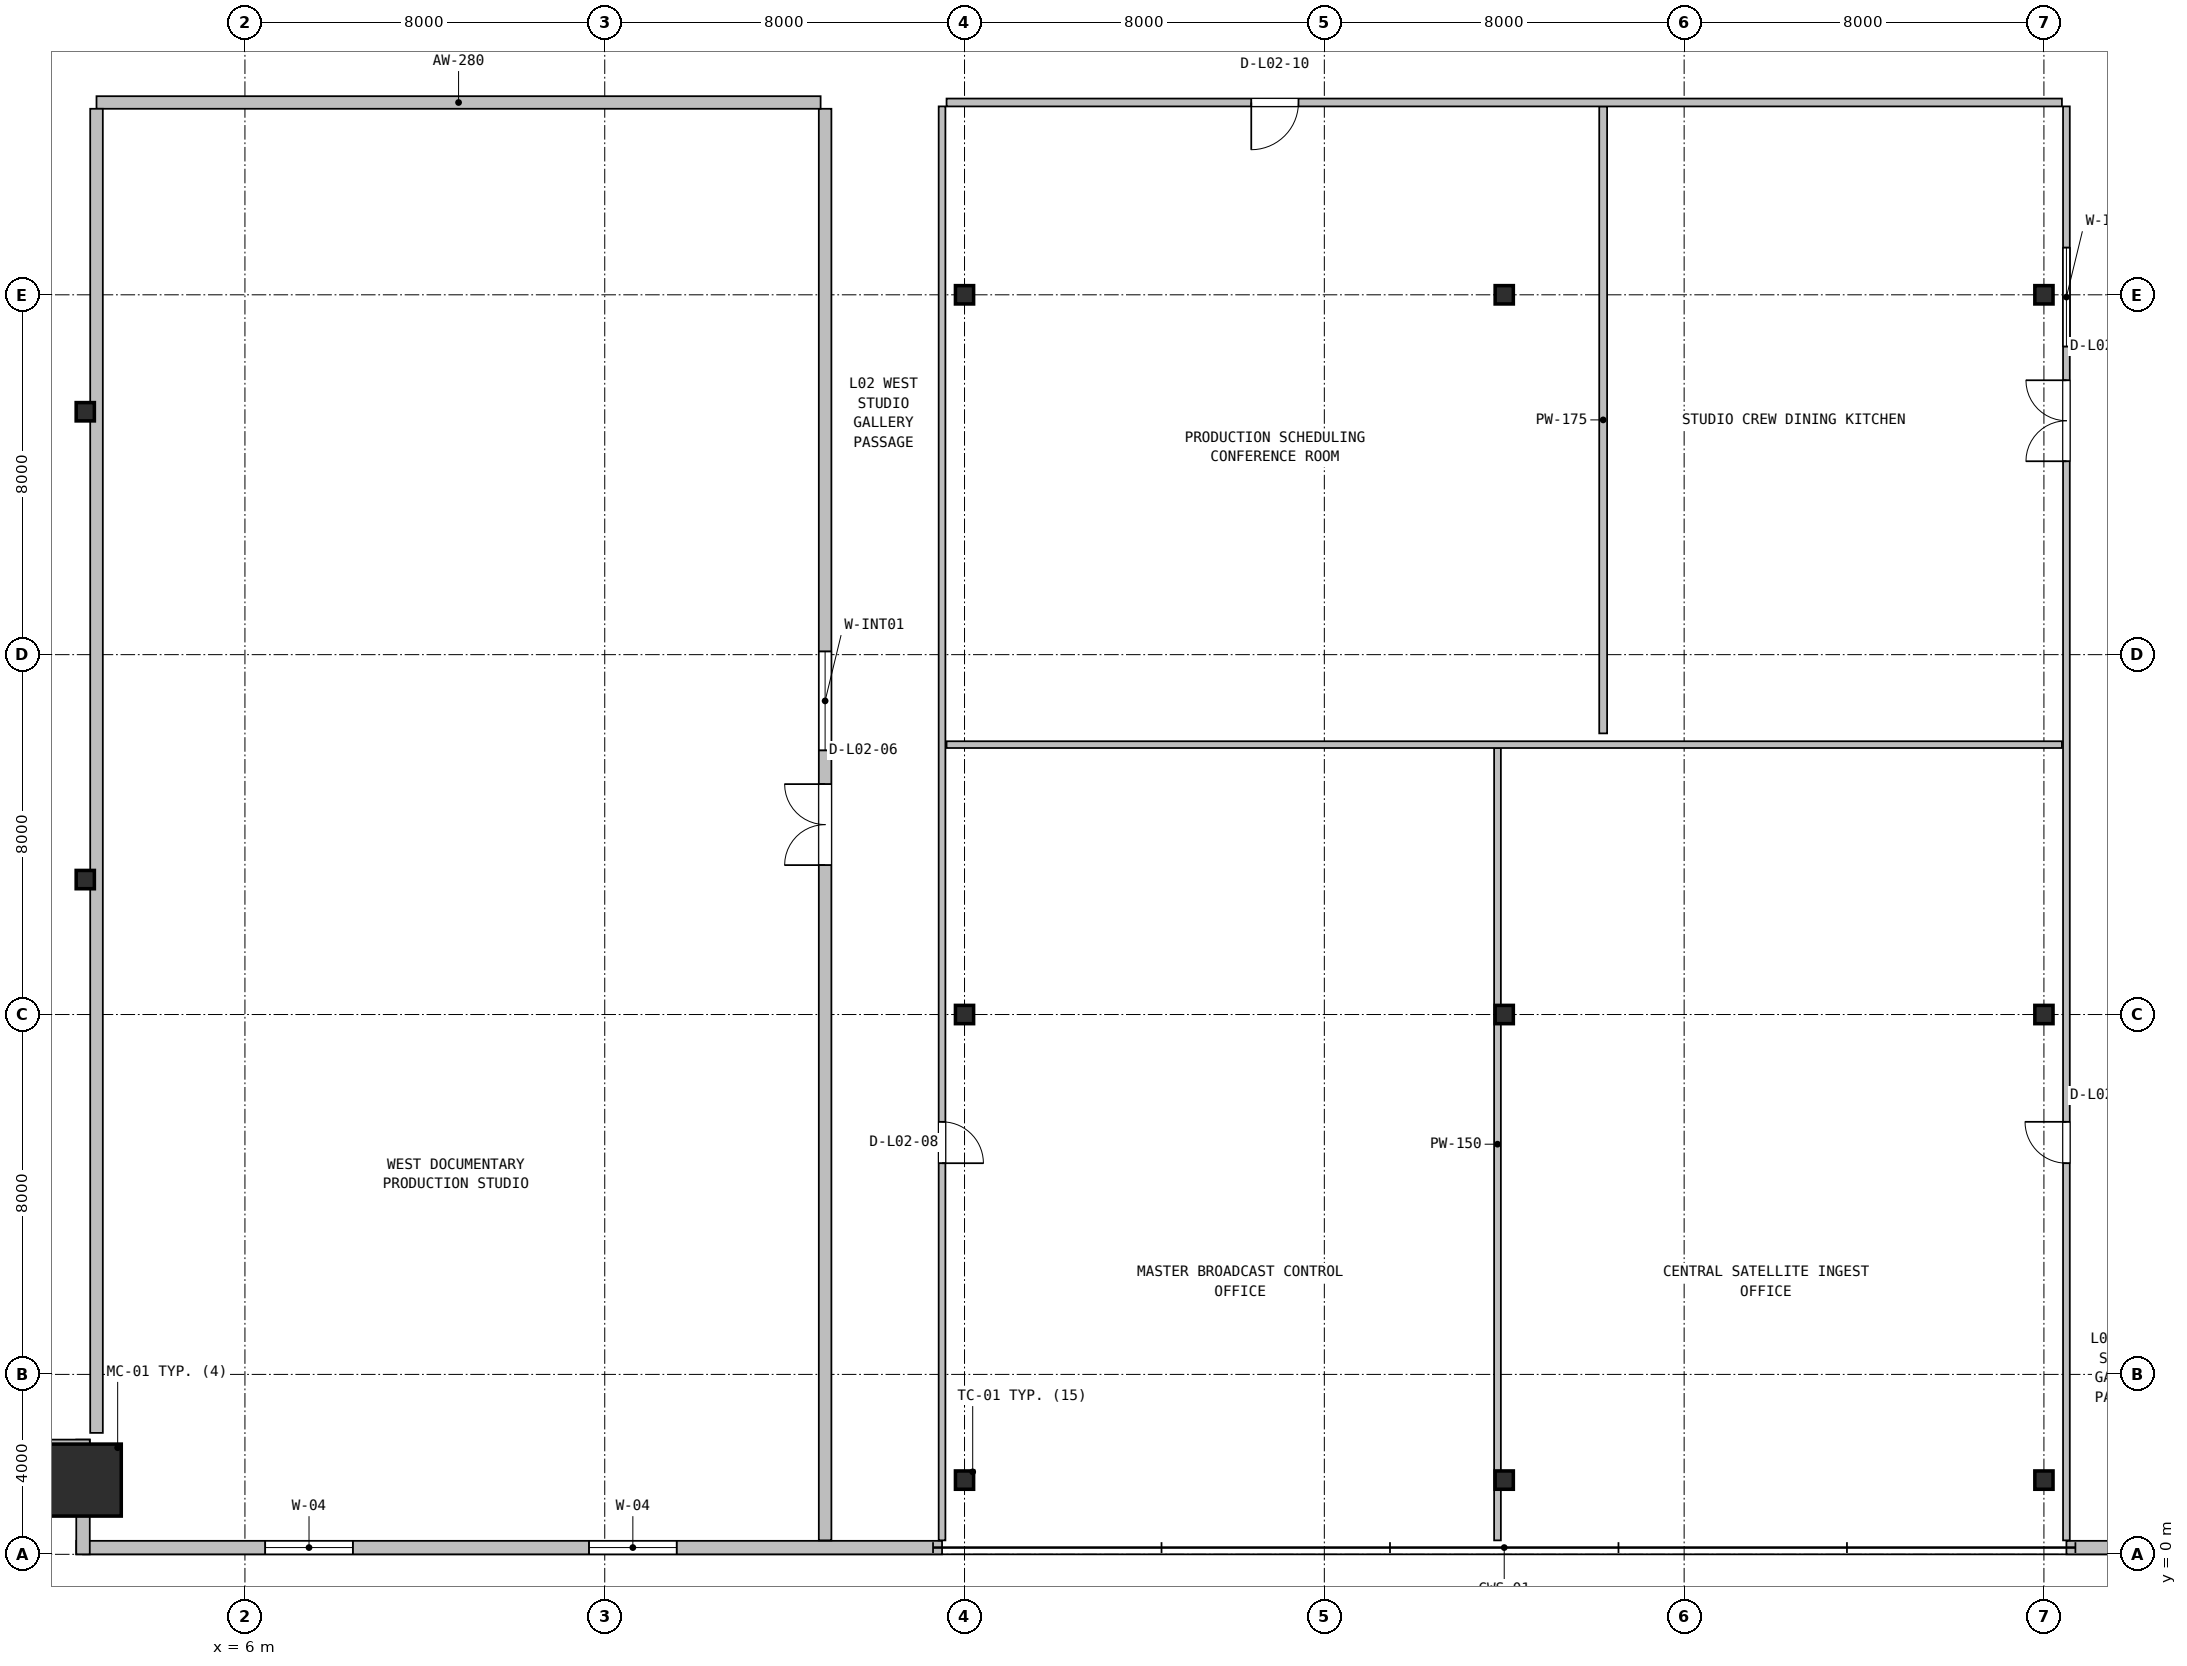
"""IFC4 building model, lengths in metres.
Left out: names, types, materials, properties, quantities, classifications, styles, units other than length and angle.
Written with IfcOpenShell. Run it as: python <this file> out.ifc"""

import sys

from ifc_helpers import new_model, si_unit, direction, frame, frame_2d, origin, origin_2d, place, context, subcontext, project, spatial, rectangle, hollow_rectangle, i_section, extrude, source, transform, mapped, element, fill, save


model = new_model("IFC4")
c1 = context("Model", 3, precision=1e-05, world=origin(), true_north=direction((0.0, 1.0)))
c2 = subcontext(c1, "Body", "Model", "MODEL_VIEW")
j1 = project(units=[si_unit("LENGTHUNIT", "METRE"), si_unit("PLANEANGLEUNIT", "RADIAN")], contexts=[c1])
p1 = place(None, origin())
s1 = spatial("IfcSite", under=j1, at=p1, CompositionType="ELEMENT")
p2 = place(p1, origin())
s2 = spatial("IfcBuilding", under=s1, at=p2, CompositionType="ELEMENT")
p3 = place(p2, frame((0.0, 0.0, 11.4)))
s3 = spatial("IfcBuildingStorey", under=s2, at=p3, CompositionType="ELEMENT", Elevation=11.4)
m1 = source(origin(), c2, "Body", "SweptSolid", [
    extrude(hollow_rectangle(XDim=1.6, YDim=1.6, WallThickness=0.06, at=origin_2d()), origin(), (0.0, 0.0, 1.0), 5.4),
])
p4 = place(p3, frame((2.45, 1.65, 0.0), z_axis=(0.0, 0.0, 1.0), x_axis=(1.0, 0.0, 0.0)))
e1 = element("IfcColumn", 1, at=p4, inside=s3, PredefinedType="COLUMN", context=c2, shape_type="MappedRepresentation", body=[
    mapped(m1, transform((0.0, 0.0, 0.0), x_axis=(1.0, 0.0, 0.0), y_axis=(0.0, 1.0, 0.0), z_axis=(0.0, 0.0, 1.0), scale=1.0)),
])
m2 = source(origin(), c2, "Body", "SweptSolid", [
    extrude(i_section(OverallWidth=0.404, OverallDepth=0.407, WebThickness=0.027, FlangeThickness=0.044, FilletRadius=0.018, at=origin_2d()), origin(), (0.0, 0.0, 1.0), 5.4),
])
for number, where, z_axis, x_axis in (
    (2, (22.0, 1.65, 0.0), (0.0, 0.0, 1.0), (1.0, 0.0, 0.0)),
    (3, (34.0, 1.65, 0.0), (0.0, 0.0, 1.0), (1.0, 0.0, 0.0)),
    (4, (46.0, 1.65, 0.0), (0.0, 0.0, 1.0), (1.0, 0.0, 0.0)),
    (5, (22.0, 12.0, 0.0), (0.0, 0.0, 1.0), (1.0, 0.0, 0.0)),
    (6, (34.0, 12.0, 0.0), (0.0, 0.0, 1.0), (1.0, 0.0, 0.0)),
    (7, (46.0, 12.0, 0.0), (0.0, 0.0, 1.0), (1.0, 0.0, 0.0)),
    (8, (22.0, 28.0, 0.0), (0.0, 0.0, 1.0), (1.0, 0.0, 0.0)),
    (9, (34.0, 28.0, 0.0), (0.0, 0.0, 1.0), (1.0, 0.0, 0.0)),
    (10, (46.0, 28.0, 0.0), (0.0, 0.0, 1.0), (1.0, 0.0, 0.0)),
    (11, (2.45, 15.0, 0.0), (0.0, 0.0, 1.0), (1.0, 0.0, 0.0)),
    (12, (2.45, 25.4, 0.0), (0.0, 0.0, 1.0), (1.0, 0.0, 0.0)),
):
    element("IfcColumn", number, at=place(p3, frame(where, z_axis=z_axis, x_axis=x_axis)), inside=s3, PredefinedType="COLUMN", context=c2, shape_type="MappedRepresentation", body=[
        mapped(m2, transform((0.0, 0.0, 0.0), x_axis=(1.0, 0.0, 0.0), y_axis=(0.0, 1.0, 0.0), z_axis=(0.0, 0.0, 1.0), scale=1.0)),
    ])
p5 = place(p3, frame((2.25, 0.15, 0.0), z_axis=(0.0, 0.0, 1.0), x_axis=(1.0, 0.0, 0.0)))
e13 = element("IfcWall", 13, at=p5, inside=s3, PredefinedType="SOLIDWALL", context=c2, shape_type="SweptSolid", body=[
    extrude(rectangle(XDim=19.25, YDim=0.3, at=frame_2d((9.625, 0.0))), origin(), (0.0, 0.0, 1.0), 5.1),
])
p6 = place(p5, frame((4.2, 0.0, 0.9)))
e14 = element("IfcOpeningElement", 14, at=p6, cuts=e13, PredefinedType="OPENING", context=c2, shape_type="SweptSolid", body=[
    extrude(rectangle(XDim=1.95, YDim=1.95, at=frame_2d((0.975, 0.975))), frame((0.0, 0.16, 0.0), z_axis=(0.0, -1.0, 0.0), x_axis=(1.0, 0.0, 0.0)), (0.0, 0.0, 1.0), 0.32),
])
p7 = place(p5, frame((11.4, 0.0, 0.9)))
e15 = element("IfcOpeningElement", 15, at=p7, cuts=e13, PredefinedType="OPENING", context=c2, shape_type="SweptSolid", body=[
    extrude(rectangle(XDim=1.95, YDim=1.95, at=frame_2d((0.975, 0.975))), frame((0.0, 0.16, 0.0), z_axis=(0.0, -1.0, 0.0), x_axis=(1.0, 0.0, 0.0)), (0.0, 0.0, 1.0), 0.32),
])
p8 = place(p3, frame((46.5, 0.15, 0.0), z_axis=(0.0, 0.0, 1.0), x_axis=(1.0, 0.0, 0.0)))
e16 = element("IfcWall", 16, at=p8, inside=s3, PredefinedType="SOLIDWALL", context=c2, shape_type="SweptSolid", body=[
    extrude(rectangle(XDim=19.25, YDim=0.3, at=frame_2d((9.625, 0.0))), origin(), (0.0, 0.0, 1.0), 5.1),
])
p9 = place(p8, frame((4.2, 0.0, 0.9)))
e17 = element("IfcOpeningElement", 17, at=p9, cuts=e16, PredefinedType="OPENING", context=c2, shape_type="SweptSolid", body=[
    extrude(rectangle(XDim=1.95, YDim=1.95, at=frame_2d((0.975, 0.975))), frame((0.0, 0.16, 0.0), z_axis=(0.0, -1.0, 0.0), x_axis=(1.0, 0.0, 0.0)), (0.0, 0.0, 1.0), 0.32),
])
p10 = place(p8, frame((11.4, 0.0, 0.9)))
e18 = element("IfcOpeningElement", 18, at=p10, cuts=e16, PredefinedType="OPENING", context=c2, shape_type="SweptSolid", body=[
    extrude(rectangle(XDim=1.95, YDim=1.95, at=frame_2d((0.975, 0.975))), frame((0.0, 0.16, 0.0), z_axis=(0.0, -1.0, 0.0), x_axis=(1.0, 0.0, 0.0)), (0.0, 0.0, 1.0), 0.32),
])
for number, where, z_axis, x_axis in (
    (19, (2.4, 0.0, 0.0), (0.0, 0.0, 1.0), (0.0, 1.0, 0.0)),
    (20, (0.0, 2.4, 0.0), (0.0, 0.0, 1.0), (1.0, 0.0, 0.0)),
):
    element("IfcWall", number, at=place(p3, frame(where, z_axis=z_axis, x_axis=x_axis)), inside=s3, PredefinedType="SOLIDWALL", context=c2, shape_type="SweptSolid", body=[
        extrude(rectangle(XDim=2.55, YDim=0.3, at=frame_2d((1.275, 0.0))), origin(), (0.0, 0.0, 1.0), 4.183),
    ])
p11 = place(p3, frame((18.9, 0.31, 0.0), z_axis=(0.0, 0.0, 1.0), x_axis=(0.0, 1.0, 0.0)))
e21 = element("IfcWall", 21, at=p11, inside=s3, PredefinedType="SOLIDWALL", context=c2, shape_type="SweptSolid", body=[
    extrude(rectangle(XDim=31.825, YDim=0.28, at=frame_2d((15.913, 0.0))), origin(), (0.0, 0.0, 1.0), 4.183),
])
p12 = place(p11, frame((15.012, 0.0, 0.0)))
e22 = element("IfcOpeningElement", 22, at=p12, cuts=e21, PredefinedType="OPENING", context=c2, shape_type="SweptSolid", body=[
    extrude(rectangle(XDim=1.8, YDim=2.25, at=frame_2d((0.9, 1.125))), frame((0.0, 0.15, 0.0), z_axis=(0.0, -1.0, 0.0), x_axis=(1.0, 0.0, 0.0)), (0.0, 0.0, 1.0), 0.3),
])
p13 = place(p11, frame((17.562, 0.0, 0.95)))
e23 = element("IfcOpeningElement", 23, at=p13, cuts=e21, PredefinedType="OPENING", context=c2, shape_type="SweptSolid", body=[
    extrude(rectangle(XDim=2.2, YDim=1.3, at=frame_2d((1.1, 0.65))), frame((0.0, 0.15, 0.0), z_axis=(0.0, -1.0, 0.0), x_axis=(1.0, 0.0, 0.0)), (0.0, 0.0, 1.0), 0.3),
])
p14 = place(p3, frame((2.7, 32.275, 0.0), z_axis=(0.0, 0.0, 1.0), x_axis=(1.0, 0.0, 0.0)))
e24 = element("IfcWall", 24, at=p14, inside=s3, PredefinedType="SOLIDWALL", context=c2, shape_type="SweptSolid", body=[
    extrude(rectangle(XDim=16.1, YDim=0.28, at=frame_2d((8.05, 0.0))), origin(), (0.0, 0.0, 1.0), 5.1),
])
p15 = place(p3, frame((2.7, 2.7, 0.0), z_axis=(0.0, 0.0, 1.0), x_axis=(0.0, 1.0, 0.0)))
e25 = element("IfcWall", 25, at=p15, inside=s3, PredefinedType="SOLIDWALL", context=c2, shape_type="SweptSolid", body=[
    extrude(rectangle(XDim=29.435, YDim=0.28, at=frame_2d((14.718, 0.0))), origin(), (0.0, 0.0, 1.0), 4.183),
])
p16 = place(p3, frame((33.85, 0.31, 0.0), z_axis=(0.0, 0.0, 1.0), x_axis=(0.0, 1.0, 0.0)))
e26 = element("IfcWall", 26, at=p16, inside=s3, PredefinedType="PARTITIONING", context=c2, shape_type="SweptSolid", body=[
    extrude(rectangle(XDim=17.615, YDim=0.15, at=frame_2d((8.808, 0.0))), origin(), (0.0, 0.0, 1.0), 4.183),
])
p17 = place(p3, frame((21.6, 18.0, 0.0), z_axis=(0.0, 0.0, 1.0), x_axis=(1.0, 0.0, 0.0)))
e27 = element("IfcWall", 27, at=p17, inside=s3, PredefinedType="PARTITIONING", context=c2, shape_type="SweptSolid", body=[
    extrude(rectangle(XDim=24.8, YDim=0.15, at=frame_2d((12.4, 0.0))), origin(), (0.0, 0.0, 1.0), 4.183),
])
p18 = place(p3, frame((21.5, 0.31, 0.0), z_axis=(0.0, 0.0, 1.0), x_axis=(0.0, 1.0, 0.0)))
e28 = element("IfcWall", 28, at=p18, inside=s3, PredefinedType="PARTITIONING", context=c2, shape_type="SweptSolid", body=[
    extrude(rectangle(XDim=31.878, YDim=0.15, at=frame_2d((15.939, 0.0))), origin(), (0.0, 0.0, 1.0), 4.183),
])
p19 = place(p18, frame((8.385, 0.0, 0.0)))
e29 = element("IfcOpeningElement", 29, at=p19, cuts=e28, PredefinedType="OPENING", context=c2, shape_type="SweptSolid", body=[
    extrude(rectangle(XDim=0.92, YDim=2.08, at=frame_2d((0.46, 1.04))), frame((0.0, 0.085, 0.0), z_axis=(0.0, -1.0, 0.0), x_axis=(1.0, 0.0, 0.0)), (0.0, 0.0, 1.0), 0.17),
])
p20 = place(p3, frame((46.5, 0.31, 0.0), z_axis=(0.0, 0.0, 1.0), x_axis=(0.0, 1.0, 0.0)))
e30 = element("IfcWall", 30, at=p20, inside=s3, PredefinedType="PARTITIONING", context=c2, shape_type="SweptSolid", body=[
    extrude(rectangle(XDim=31.878, YDim=0.15, at=frame_2d((15.939, 0.0))), origin(), (0.0, 0.0, 1.0), 4.183),
])
p21 = place(p20, frame((8.385, 0.0, 0.0)))
e31 = element("IfcOpeningElement", 31, at=p21, cuts=e30, PredefinedType="OPENING", context=c2, shape_type="SweptSolid", body=[
    extrude(rectangle(XDim=0.92, YDim=2.08, at=frame_2d((0.46, 1.04))), frame((0.0, 0.085, 0.0), z_axis=(0.0, -1.0, 0.0), x_axis=(1.0, 0.0, 0.0)), (0.0, 0.0, 1.0), 0.17),
])
p22 = place(p20, frame((23.99, 0.0, 0.0)))
e32 = element("IfcOpeningElement", 32, at=p22, cuts=e30, PredefinedType="OPENING", context=c2, shape_type="SweptSolid", body=[
    extrude(rectangle(XDim=1.8, YDim=2.25, at=frame_2d((0.9, 1.125))), frame((0.0, 0.085, 0.0), z_axis=(0.0, -1.0, 0.0), x_axis=(1.0, 0.0, 0.0)), (0.0, 0.0, 1.0), 0.17),
])
p23 = place(p20, frame((26.54, 0.0, 0.95)))
e33 = element("IfcOpeningElement", 33, at=p23, cuts=e30, PredefinedType="OPENING", context=c2, shape_type="SweptSolid", body=[
    extrude(rectangle(XDim=2.2, YDim=1.3, at=frame_2d((1.1, 0.65))), frame((0.0, 0.085, 0.0), z_axis=(0.0, -1.0, 0.0), x_axis=(1.0, 0.0, 0.0)), (0.0, 0.0, 1.0), 0.17),
])
p24 = place(p3, frame((36.2, 18.25, 0.0), z_axis=(0.0, 0.0, 1.0), x_axis=(0.0, 1.0, 0.0)))
e34 = element("IfcWall", 34, at=p24, inside=s3, PredefinedType="PARTITIONING", context=c2, shape_type="SweptSolid", body=[
    extrude(rectangle(XDim=13.938, YDim=0.175, at=frame_2d((6.969, 0.0))), origin(), (0.0, 0.0, 1.0), 4.183),
])
p25 = place(p3, frame((21.6, 32.275, 0.0), z_axis=(0.0, 0.0, 1.0), x_axis=(1.0, 0.0, 0.0)))
e35 = element("IfcWall", 35, at=p25, inside=s3, PredefinedType="PARTITIONING", context=c2, shape_type="SweptSolid", body=[
    extrude(rectangle(XDim=24.8, YDim=0.175, at=frame_2d((12.4, 0.0))), origin(), (0.0, 0.0, 1.0), 4.183),
])
p26 = place(p25, frame((6.775, 0.0, 0.0)))
e36 = element("IfcOpeningElement", 36, at=p26, cuts=e35, PredefinedType="OPENING", context=c2, shape_type="SweptSolid", body=[
    extrude(rectangle(XDim=1.05, YDim=2.1, at=frame_2d((0.525, 1.05))), frame((0.0, 0.098, 0.0), z_axis=(0.0, -1.0, 0.0), x_axis=(1.0, 0.0, 0.0)), (0.0, 0.0, 1.0), 0.195),
])
m3 = source(origin(), c2, "Body", "SweptSolid", [
    extrude(rectangle(XDim=1.95, YDim=1.95, at=frame_2d((0.975, 0.975))), frame((0.0, 0.03, 0.0), z_axis=(0.0, -1.0, 0.0), x_axis=(1.0, 0.0, 0.0)), (0.0, 0.0, 1.0), 0.06),
])
p27 = place(p6, origin())
e37 = element("IfcWindow", 37, at=p27, inside=s3, PartitioningType="SINGLE_PANEL", PredefinedType="WINDOW", context=c2, shape_type="MappedRepresentation", body=[
    mapped(m3, transform((0.0, 0.0, 0.0), x_axis=(1.0, 0.0, 0.0), y_axis=(0.0, 1.0, 0.0), z_axis=(0.0, 0.0, 1.0), scale=1.0)),
])
fill(e14, e37)
p28 = place(p7, origin())
e38 = element("IfcWindow", 38, at=p28, inside=s3, PartitioningType="SINGLE_PANEL", PredefinedType="WINDOW", context=c2, shape_type="MappedRepresentation", body=[
    mapped(m3, transform((0.0, 0.0, 0.0), x_axis=(1.0, 0.0, 0.0), y_axis=(0.0, 1.0, 0.0), z_axis=(0.0, 0.0, 1.0), scale=1.0)),
])
fill(e15, e38)
m4 = source(origin(), c2, "Body", "SweptSolid", [
    extrude(rectangle(XDim=1.8, YDim=2.25, at=frame_2d((0.9, 1.125))), frame((0.0, 0.025, 0.0), z_axis=(0.0, -1.0, 0.0), x_axis=(1.0, 0.0, 0.0)), (0.0, 0.0, 1.0), 0.05),
])
p29 = place(p12, origin())
e39 = element("IfcDoor", 39, at=p29, inside=s3, OperationType="DOUBLE_DOOR_SINGLE_SWING", PredefinedType="DOOR", context=c2, shape_type="MappedRepresentation", body=[
    mapped(m4, transform((0.0, 0.0, 0.0), x_axis=(1.0, 0.0, 0.0), y_axis=(0.0, 1.0, 0.0), z_axis=(0.0, 0.0, 1.0), scale=1.0)),
])
fill(e22, e39)
m5 = source(origin(), c2, "Body", "SweptSolid", [
    extrude(rectangle(XDim=2.2, YDim=1.3, at=frame_2d((1.1, 0.65))), frame((0.0, 0.03, 0.0), z_axis=(0.0, -1.0, 0.0), x_axis=(1.0, 0.0, 0.0)), (0.0, 0.0, 1.0), 0.06),
])
p30 = place(p13, origin())
e40 = element("IfcWindow", 40, at=p30, inside=s3, PartitioningType="SINGLE_PANEL", PredefinedType="WINDOW", context=c2, shape_type="MappedRepresentation", body=[
    mapped(m5, transform((0.0, 0.0, 0.0), x_axis=(1.0, 0.0, 0.0), y_axis=(0.0, 1.0, 0.0), z_axis=(0.0, 0.0, 1.0), scale=1.0)),
])
fill(e23, e40)
m6 = source(origin(), c2, "Body", "SweptSolid", [
    extrude(rectangle(XDim=0.92, YDim=2.08, at=frame_2d((0.46, 1.04))), frame((0.0, 0.025, 0.0), z_axis=(0.0, -1.0, 0.0), x_axis=(1.0, 0.0, 0.0)), (0.0, 0.0, 1.0), 0.05),
])
p31 = place(p19, frame((0.92, 0.0, 0.0), z_axis=(0.0, 0.0, 1.0), x_axis=(-1.0, 0.0, 0.0)))
e41 = element("IfcDoor", 41, at=p31, inside=s3, OperationType="SINGLE_SWING_LEFT", PredefinedType="DOOR", context=c2, shape_type="MappedRepresentation", body=[
    mapped(m6, transform((0.0, 0.0, 0.0), x_axis=(1.0, 0.0, 0.0), y_axis=(0.0, 1.0, 0.0), z_axis=(0.0, 0.0, 1.0), scale=1.0)),
])
fill(e29, e41)
p32 = place(p21, origin())
e42 = element("IfcDoor", 42, at=p32, inside=s3, OperationType="SINGLE_SWING_RIGHT", PredefinedType="DOOR", context=c2, shape_type="MappedRepresentation", body=[
    mapped(m6, transform((0.0, 0.0, 0.0), x_axis=(1.0, 0.0, 0.0), y_axis=(0.0, 1.0, 0.0), z_axis=(0.0, 0.0, 1.0), scale=1.0)),
])
fill(e31, e42)
p33 = place(p22, origin())
e43 = element("IfcDoor", 43, at=p33, inside=s3, OperationType="DOUBLE_DOOR_SINGLE_SWING", PredefinedType="DOOR", context=c2, shape_type="MappedRepresentation", body=[
    mapped(m4, transform((0.0, 0.0, 0.0), x_axis=(1.0, 0.0, 0.0), y_axis=(0.0, 1.0, 0.0), z_axis=(0.0, 0.0, 1.0), scale=1.0)),
])
fill(e32, e43)
p34 = place(p23, origin())
e44 = element("IfcWindow", 44, at=p34, inside=s3, PartitioningType="SINGLE_PANEL", PredefinedType="WINDOW", context=c2, shape_type="MappedRepresentation", body=[
    mapped(m5, transform((0.0, 0.0, 0.0), x_axis=(1.0, 0.0, 0.0), y_axis=(0.0, 1.0, 0.0), z_axis=(0.0, 0.0, 1.0), scale=1.0)),
])
fill(e33, e44)
m7 = source(origin(), c2, "Body", "SweptSolid", [
    extrude(rectangle(XDim=1.05, YDim=2.1, at=frame_2d((0.525, 1.05))), frame((0.0, 0.025, 0.0), z_axis=(0.0, -1.0, 0.0), x_axis=(1.0, 0.0, 0.0)), (0.0, 0.0, 1.0), 0.05),
])
p35 = place(p26, frame((1.05, 0.0, 0.0), z_axis=(0.0, 0.0, 1.0), x_axis=(-1.0, 0.0, 0.0)))
e45 = element("IfcDoor", 45, at=p35, inside=s3, OperationType="SINGLE_SWING_LEFT", PredefinedType="DOOR", context=c2, shape_type="MappedRepresentation", body=[
    mapped(m7, transform((0.0, 0.0, 0.0), x_axis=(1.0, 0.0, 0.0), y_axis=(0.0, 1.0, 0.0), z_axis=(0.0, 0.0, 1.0), scale=1.0)),
])
fill(e36, e45)
save(model, sys.argv[1])
